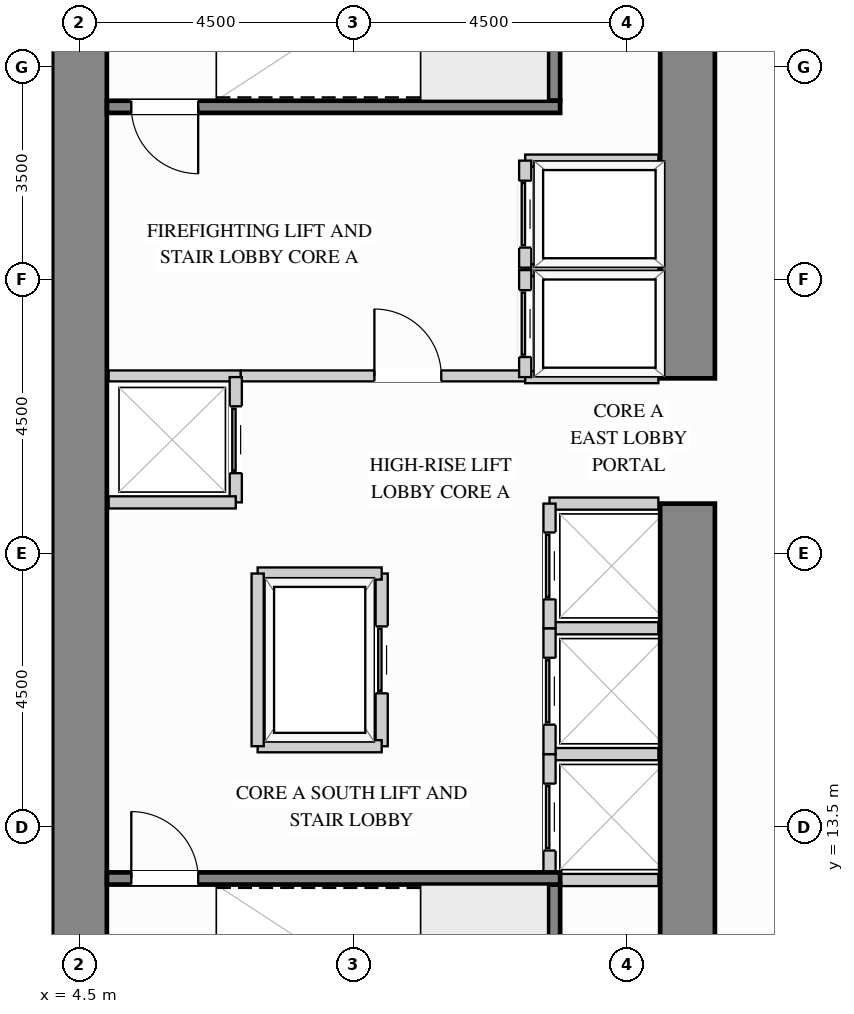
"""IFC4 building model, lengths in metres.
Left out: names, types, materials, properties, quantities, classifications, styles, units other than length and angle.
Written with IfcOpenShell. Run it as: python <this file> out.ifc"""

import sys

from ifc_helpers import new_model, si_unit, direction, frame, frame_2d, origin, place, context, subcontext, project, spatial, rectangle, extrude, source, transform, mapped, element, fill, save


model = new_model("IFC4")
c1 = context("Model", 3, precision=1e-05, world=origin(), true_north=direction((0.0, 1.0)))
c2 = subcontext(c1, "Body", "Model", "MODEL_VIEW")
j1 = project(units=[si_unit("LENGTHUNIT", "METRE"), si_unit("PLANEANGLEUNIT", "RADIAN")], contexts=[c1])
p1 = place(None, origin())
s1 = spatial("IfcSite", under=j1, at=p1, CompositionType="ELEMENT")
p2 = place(p1, origin())
s2 = spatial("IfcBuilding", under=s1, at=p2, CompositionType="ELEMENT")
p3 = place(p2, frame((0.0, 0.0, 4.5)))
s3 = spatial("IfcBuildingStorey", under=s2, at=p3, CompositionType="ELEMENT", Elevation=4.5)
m1 = source(origin(), c2, "Body", "SweptSolid", [
    extrude(rectangle(XDim=9.87, YDim=0.9, at=frame_2d((4.935, 0.0))), origin(), (0.0, 0.0, 1.0), 4.25),
])
p4 = place(p3, frame((14.5, 8.95, 0.0), z_axis=(0.0, 0.0, 1.0), x_axis=(0.0, 1.0, 0.0)))
e1 = element("IfcWall", 1, at=p4, inside=s3, PredefinedType="SHEAR", context=c2, shape_type="MappedRepresentation", body=[
    mapped(m1, transform((0.0, 0.0, 0.0), x_axis=(1.0, 0.0, 0.0), y_axis=(0.0, 1.0, 0.0), z_axis=(0.0, 0.0, 1.0))),
])
m2 = source(origin(), c2, "Body", "SweptSolid", [
    extrude(rectangle(XDim=8.17, YDim=0.9, at=frame_2d((4.085, 0.0))), origin(), (0.0, 0.0, 1.0), 4.25),
])
p5 = place(p3, frame((14.5, 20.88, 0.0), z_axis=(0.0, 0.0, 1.0), x_axis=(0.0, 1.0, 0.0)))
e2 = element("IfcWall", 2, at=p5, inside=s3, PredefinedType="SHEAR", context=c2, shape_type="MappedRepresentation", body=[
    mapped(m2, transform((0.0, 0.0, 0.0), x_axis=(1.0, 0.0, 0.0), y_axis=(0.0, 1.0, 0.0), z_axis=(0.0, 0.0, 1.0))),
])
m3 = source(origin(), c2, "Body", "SweptSolid", [
    extrude(rectangle(XDim=20.1, YDim=0.9, at=frame_2d((10.05, 0.0))), origin(), (0.0, 0.0, 1.0), 4.25),
])
p6 = place(p3, frame((4.5, 8.95, 0.0), z_axis=(0.0, 0.0, 1.0), x_axis=(0.0, 1.0, 0.0)))
e3 = element("IfcWall", 3, at=p6, inside=s3, PredefinedType="SHEAR", context=c2, shape_type="MappedRepresentation", body=[
    mapped(m3, transform((0.0, 0.0, 0.0), x_axis=(1.0, 0.0, 0.0), y_axis=(0.0, 1.0, 0.0), z_axis=(0.0, 0.0, 1.0))),
])
p7 = place(p3, frame((7.15, 20.92, 0.0), z_axis=(0.0, 0.0, 1.0), x_axis=(1.0, 0.0, 0.0)))
e4 = element("IfcWall", 4, at=p7, inside=s3, PredefinedType="PARTITIONING", context=c2, shape_type="SweptSolid", body=[
    extrude(rectangle(XDim=4.68, YDim=0.18, at=frame_2d((2.34, 0.0))), origin(), (0.0, 0.0, 1.0), 4.235),
])
p8 = place(p7, frame((2.2, 0.0, 0.0)))
e5 = element("IfcOpeningElement", 5, at=p8, cuts=e4, PredefinedType="OPENING", context=c2, shape_type="SweptSolid", body=[
    extrude(rectangle(XDim=1.1, YDim=2.15, at=frame_2d((0.55, 1.075))), frame((0.0, 0.1, 0.0), z_axis=(0.0, -1.0, 0.0), x_axis=(1.0, 0.0, 0.0)), (0.0, 0.0, 1.0), 0.2),
])
m4 = source(origin(), c2, "Body", "SweptSolid", [
    extrude(rectangle(XDim=2.17, YDim=0.18, at=frame_2d((1.085, 0.0))), origin(), (0.0, 0.0, 1.0), 4.235),
])
p9 = place(p3, frame((4.98, 20.92, 0.0), z_axis=(0.0, 0.0, 1.0), x_axis=(1.0, 0.0, 0.0)))
e6 = element("IfcWall", 6, at=p9, inside=s3, PredefinedType="PARTITIONING", context=c2, shape_type="MappedRepresentation", body=[
    mapped(m4, transform((0.0, 0.0, 0.0), x_axis=(1.0, 0.0, 0.0), y_axis=(0.0, 1.0, 0.0), z_axis=(0.0, 0.0, 1.0))),
])
m5 = source(origin(), c2, "Body", "SweptSolid", [
    extrude(rectangle(XDim=2.19, YDim=0.2, at=frame_2d((1.095, 0.0))), origin(), (0.0, 0.0, 1.0), 4.235),
])
for number, where, z_axis, x_axis in (
    (7, (11.83, 22.66, 0.0), (0.0, 0.0, 1.0), (1.0, 0.0, 0.0)),
    (8, (11.83, 20.9, 0.0), (0.0, 0.0, 1.0), (1.0, 0.0, 0.0)),
):
    element("IfcWall", number, at=place(p3, frame(where, z_axis=z_axis, x_axis=x_axis)), inside=s3, PredefinedType="PARTITIONING", context=c2, shape_type="MappedRepresentation", body=[
        mapped(m5, transform((0.0, 0.0, 0.0), x_axis=(1.0, 0.0, 0.0), y_axis=(0.0, 1.0, 0.0), z_axis=(0.0, 0.0, 1.0))),
    ])
p10 = place(p3, frame((11.83, 20.9, 0.0), z_axis=(0.0, 0.0, 1.0), x_axis=(0.0, 1.0, 0.0)))
e9 = element("IfcWall", 9, at=p10, inside=s3, PredefinedType="PARTITIONING", context=c2, shape_type="SweptSolid", body=[
    extrude(rectangle(XDim=1.76, YDim=0.2, at=frame_2d((0.88, 0.0))), origin(), (0.0, 0.0, 1.0), 4.235),
])
p11 = place(p10, frame((0.33, 0.0, 0.0)))
e10 = element("IfcOpeningElement", 10, at=p11, cuts=e9, PredefinedType="OPENING", context=c2, shape_type="SweptSolid", body=[
    extrude(rectangle(XDim=1.1, YDim=2.2, at=frame_2d((0.55, 1.1))), frame((0.0, 0.11, 0.0), z_axis=(0.0, -1.0, 0.0), x_axis=(1.0, 0.0, 0.0)), (0.0, 0.0, 1.0), 0.22),
])
p12 = place(p3, frame((11.83, 24.46, 0.0), z_axis=(0.0, 0.0, 1.0), x_axis=(1.0, 0.0, 0.0)))
e11 = element("IfcWall", 11, at=p12, inside=s3, PredefinedType="PARTITIONING", context=c2, shape_type="MappedRepresentation", body=[
    mapped(m5, transform((0.0, 0.0, 0.0), x_axis=(1.0, 0.0, 0.0), y_axis=(0.0, 1.0, 0.0), z_axis=(0.0, 0.0, 1.0))),
])
p13 = place(p3, frame((11.83, 22.7, 0.0), z_axis=(0.0, 0.0, 1.0), x_axis=(0.0, 1.0, 0.0)))
e12 = element("IfcWall", 12, at=p13, inside=s3, PredefinedType="PARTITIONING", context=c2, shape_type="SweptSolid", body=[
    extrude(rectangle(XDim=1.76, YDim=0.2, at=frame_2d((0.88, 0.0))), origin(), (0.0, 0.0, 1.0), 4.235),
])
p14 = place(p13, frame((0.33, 0.0, 0.0)))
e13 = element("IfcOpeningElement", 13, at=p14, cuts=e12, PredefinedType="OPENING", context=c2, shape_type="SweptSolid", body=[
    extrude(rectangle(XDim=1.1, YDim=2.2, at=frame_2d((0.55, 1.1))), frame((0.0, 0.11, 0.0), z_axis=(0.0, -1.0, 0.0), x_axis=(1.0, 0.0, 0.0)), (0.0, 0.0, 1.0), 0.22),
])
m6 = source(origin(), c2, "Body", "SweptSolid", [
    extrude(rectangle(XDim=1.79, YDim=0.2, at=frame_2d((0.895, 0.0))), origin(), (0.0, 0.0, 1.0), 4.235),
])
for number, where, z_axis, x_axis in (
    (14, (12.23, 14.7, 0.0), (0.0, 0.0, 1.0), (1.0, 0.0, 0.0)),
    (15, (12.23, 12.63, 0.0), (0.0, 0.0, 1.0), (1.0, 0.0, 0.0)),
):
    element("IfcWall", number, at=place(p3, frame(where, z_axis=z_axis, x_axis=x_axis)), inside=s3, PredefinedType="PARTITIONING", context=c2, shape_type="MappedRepresentation", body=[
        mapped(m6, transform((0.0, 0.0, 0.0), x_axis=(1.0, 0.0, 0.0), y_axis=(0.0, 1.0, 0.0), z_axis=(0.0, 0.0, 1.0))),
    ])
p15 = place(p3, frame((12.23, 12.63, 0.0), z_axis=(0.0, 0.0, 1.0), x_axis=(0.0, 1.0, 0.0)))
e16 = element("IfcWall", 16, at=p15, inside=s3, PredefinedType="PARTITIONING", context=c2, shape_type="SweptSolid", body=[
    extrude(rectangle(XDim=2.07, YDim=0.2, at=frame_2d((1.035, 0.0))), origin(), (0.0, 0.0, 1.0), 4.235),
])
p16 = place(p15, frame((0.485, 0.0, 0.0)))
e17 = element("IfcOpeningElement", 17, at=p16, cuts=e16, PredefinedType="OPENING", context=c2, shape_type="SweptSolid", body=[
    extrude(rectangle(XDim=1.1, YDim=2.2, at=frame_2d((0.55, 1.1))), frame((0.0, 0.11, 0.0), z_axis=(0.0, -1.0, 0.0), x_axis=(1.0, 0.0, 0.0)), (0.0, 0.0, 1.0), 0.22),
])
p17 = place(p3, frame((12.23, 16.77, 0.0), z_axis=(0.0, 0.0, 1.0), x_axis=(1.0, 0.0, 0.0)))
e18 = element("IfcWall", 18, at=p17, inside=s3, PredefinedType="PARTITIONING", context=c2, shape_type="MappedRepresentation", body=[
    mapped(m6, transform((0.0, 0.0, 0.0), x_axis=(1.0, 0.0, 0.0), y_axis=(0.0, 1.0, 0.0), z_axis=(0.0, 0.0, 1.0))),
])
p18 = place(p3, frame((12.23, 14.7, 0.0), z_axis=(0.0, 0.0, 1.0), x_axis=(0.0, 1.0, 0.0)))
e19 = element("IfcWall", 19, at=p18, inside=s3, PredefinedType="PARTITIONING", context=c2, shape_type="SweptSolid", body=[
    extrude(rectangle(XDim=2.07, YDim=0.2, at=frame_2d((1.035, 0.0))), origin(), (0.0, 0.0, 1.0), 4.235),
])
p19 = place(p18, frame((0.485, 0.0, 0.0)))
e20 = element("IfcOpeningElement", 20, at=p19, cuts=e19, PredefinedType="OPENING", context=c2, shape_type="SweptSolid", body=[
    extrude(rectangle(XDim=1.1, YDim=2.2, at=frame_2d((0.55, 1.1))), frame((0.0, 0.11, 0.0), z_axis=(0.0, -1.0, 0.0), x_axis=(1.0, 0.0, 0.0)), (0.0, 0.0, 1.0), 0.22),
])
p20 = place(p3, frame((12.23, 18.82, 0.0), z_axis=(0.0, 0.0, 1.0), x_axis=(1.0, 0.0, 0.0)))
e21 = element("IfcWall", 21, at=p20, inside=s3, PredefinedType="PARTITIONING", context=c2, shape_type="MappedRepresentation", body=[
    mapped(m6, transform((0.0, 0.0, 0.0), x_axis=(1.0, 0.0, 0.0), y_axis=(0.0, 1.0, 0.0), z_axis=(0.0, 0.0, 1.0))),
])
p21 = place(p3, frame((12.23, 16.77, 0.0), z_axis=(0.0, 0.0, 1.0), x_axis=(0.0, 1.0, 0.0)))
e22 = element("IfcWall", 22, at=p21, inside=s3, PredefinedType="PARTITIONING", context=c2, shape_type="SweptSolid", body=[
    extrude(rectangle(XDim=2.05, YDim=0.2, at=frame_2d((1.025, 0.0))), origin(), (0.0, 0.0, 1.0), 4.235),
])
p22 = place(p21, frame((0.475, 0.0, 0.0)))
e23 = element("IfcOpeningElement", 23, at=p22, cuts=e22, PredefinedType="OPENING", context=c2, shape_type="SweptSolid", body=[
    extrude(rectangle(XDim=1.1, YDim=2.2, at=frame_2d((0.55, 1.1))), frame((0.0, 0.11, 0.0), z_axis=(0.0, -1.0, 0.0), x_axis=(1.0, 0.0, 0.0)), (0.0, 0.0, 1.0), 0.22),
])
p23 = place(p3, frame((7.07, 18.84, 0.0), z_axis=(0.0, 0.0, 1.0), x_axis=(0.0, 1.0, 0.0)))
e24 = element("IfcWall", 24, at=p23, inside=s3, PredefinedType="PARTITIONING", context=c2, shape_type="SweptSolid", body=[
    extrude(rectangle(XDim=2.06, YDim=0.2, at=frame_2d((1.03, 0.0))), origin(), (0.0, 0.0, 1.0), 4.235),
])
p24 = place(p23, frame((0.48, 0.0, 0.0)))
e25 = element("IfcOpeningElement", 25, at=p24, cuts=e24, PredefinedType="OPENING", context=c2, shape_type="SweptSolid", body=[
    extrude(rectangle(XDim=1.1, YDim=2.2, at=frame_2d((0.55, 1.1))), frame((0.0, 0.11, 0.0), z_axis=(0.0, -1.0, 0.0), x_axis=(1.0, 0.0, 0.0)), (0.0, 0.0, 1.0), 0.22),
])
m7 = source(origin(), c2, "Body", "SweptSolid", [
    extrude(rectangle(XDim=2.09, YDim=0.2, at=frame_2d((1.045, 0.0))), origin(), (0.0, 0.0, 1.0), 4.235),
])
p25 = place(p3, frame((4.98, 18.84, 0.0), z_axis=(0.0, 0.0, 1.0), x_axis=(1.0, 0.0, 0.0)))
e26 = element("IfcWall", 26, at=p25, inside=s3, PredefinedType="PARTITIONING", context=c2, shape_type="MappedRepresentation", body=[
    mapped(m7, transform((0.0, 0.0, 0.0), x_axis=(1.0, 0.0, 0.0), y_axis=(0.0, 1.0, 0.0), z_axis=(0.0, 0.0, 1.0))),
])
p26 = place(p3, frame((9.47, 14.83, 0.0), z_axis=(0.0, 0.0, 1.0), x_axis=(0.0, 1.0, 0.0)))
e27 = element("IfcWall", 27, at=p26, inside=s3, PredefinedType="PARTITIONING", context=c2, shape_type="SweptSolid", body=[
    extrude(rectangle(XDim=2.84, YDim=0.2, at=frame_2d((1.42, 0.0))), origin(), (0.0, 0.0, 1.0), 4.235),
])
p27 = place(p26, frame((0.87, 0.0, 0.0)))
e28 = element("IfcOpeningElement", 28, at=p27, cuts=e27, PredefinedType="OPENING", context=c2, shape_type="SweptSolid", body=[
    extrude(rectangle(XDim=1.1, YDim=2.2, at=frame_2d((0.55, 1.1))), frame((0.0, 0.11, 0.0), z_axis=(0.0, -1.0, 0.0), x_axis=(1.0, 0.0, 0.0)), (0.0, 0.0, 1.0), 0.22),
])
m8 = source(origin(), c2, "Body", "SweptSolid", [
    extrude(rectangle(XDim=2.04, YDim=0.2, at=frame_2d((1.02, 0.0))), origin(), (0.0, 0.0, 1.0), 4.235),
])
for number, where, z_axis, x_axis in (
    (29, (7.43, 17.67, 0.0), (0.0, 0.0, 1.0), (1.0, 0.0, 0.0)),
    (30, (7.43, 14.83, 0.0), (0.0, 0.0, 1.0), (1.0, 0.0, 0.0)),
):
    element("IfcWall", number, at=place(p3, frame(where, z_axis=z_axis, x_axis=x_axis)), inside=s3, PredefinedType="PARTITIONING", context=c2, shape_type="MappedRepresentation", body=[
        mapped(m8, transform((0.0, 0.0, 0.0), x_axis=(1.0, 0.0, 0.0), y_axis=(0.0, 1.0, 0.0), z_axis=(0.0, 0.0, 1.0))),
    ])
m9 = source(origin(), c2, "Body", "SweptSolid", [
    extrude(rectangle(XDim=2.84, YDim=0.2, at=frame_2d((1.42, 0.0))), origin(), (0.0, 0.0, 1.0), 4.235),
])
p28 = place(p3, frame((7.43, 14.83, 0.0), z_axis=(0.0, 0.0, 1.0), x_axis=(0.0, 1.0, 0.0)))
e31 = element("IfcWall", 31, at=p28, inside=s3, PredefinedType="PARTITIONING", context=c2, shape_type="MappedRepresentation", body=[
    mapped(m9, transform((0.0, 0.0, 0.0), x_axis=(1.0, 0.0, 0.0), y_axis=(0.0, 1.0, 0.0), z_axis=(0.0, 0.0, 1.0))),
])
m10 = source(origin(), c2, "Body", "SweptSolid", [
    extrude(rectangle(XDim=3.603, YDim=0.2, at=frame_2d((1.802, 0.0))), origin(), (0.0, 0.0, 1.0), 4.25),
])
p29 = place(p3, frame((12.305, 8.952, 0.0), z_axis=(0.0, 0.0, 1.0), x_axis=(0.0, 1.0, 0.0)))
e32 = element("IfcWall", 32, at=p29, inside=s3, PredefinedType="SHEAR", context=c2, shape_type="MappedRepresentation", body=[
    mapped(m10, transform((0.0, 0.0, 0.0), x_axis=(1.0, 0.0, 0.0), y_axis=(0.0, 1.0, 0.0), z_axis=(0.0, 0.0, 1.0))),
])
p30 = place(p3, frame((4.952, 12.655, 0.0), z_axis=(0.0, 0.0, 1.0), x_axis=(1.0, 0.0, 0.0)))
e33 = element("IfcWall", 33, at=p30, inside=s3, PredefinedType="SHEAR", context=c2, shape_type="SweptSolid", body=[
    extrude(rectangle(XDim=7.453, YDim=0.2, at=frame_2d((3.727, 0.0))), origin(), (0.0, 0.0, 1.0), 4.25),
])
p31 = place(p30, frame((0.4, 0.0, 0.0)))
e34 = element("IfcOpeningElement", 34, at=p31, cuts=e33, PredefinedType="OPENING", context=c2, shape_type="SweptSolid", body=[
    extrude(rectangle(XDim=1.1, YDim=2.15, at=frame_2d((0.55, 1.075))), frame((0.0, 0.11, 0.0), z_axis=(0.0, -1.0, 0.0), x_axis=(1.0, 0.0, 0.0)), (0.0, 0.0, 1.0), 0.22),
])
p32 = place(p3, frame((12.305, 25.445, 0.0), z_axis=(0.0, 0.0, 1.0), x_axis=(0.0, 1.0, 0.0)))
e35 = element("IfcWall", 35, at=p32, inside=s3, PredefinedType="SHEAR", context=c2, shape_type="MappedRepresentation", body=[
    mapped(m10, transform((0.0, 0.0, 0.0), x_axis=(1.0, 0.0, 0.0), y_axis=(0.0, 1.0, 0.0), z_axis=(0.0, 0.0, 1.0))),
])
p33 = place(p3, frame((4.952, 25.345, 0.0), z_axis=(0.0, 0.0, 1.0), x_axis=(1.0, 0.0, 0.0)))
e36 = element("IfcWall", 36, at=p33, inside=s3, PredefinedType="SHEAR", context=c2, shape_type="SweptSolid", body=[
    extrude(rectangle(XDim=7.453, YDim=0.2, at=frame_2d((3.727, 0.0))), origin(), (0.0, 0.0, 1.0), 4.25),
])
p34 = place(p33, frame((0.4, 0.0, 0.0)))
e37 = element("IfcOpeningElement", 37, at=p34, cuts=e36, PredefinedType="OPENING", context=c2, shape_type="SweptSolid", body=[
    extrude(rectangle(XDim=1.1, YDim=2.15, at=frame_2d((0.55, 1.075))), frame((0.0, 0.11, 0.0), z_axis=(0.0, -1.0, 0.0), x_axis=(1.0, 0.0, 0.0)), (0.0, 0.0, 1.0), 0.22),
])
m11 = source(origin(), c2, "Body", "SweptSolid", [
    extrude(rectangle(XDim=1.1, YDim=2.15, at=frame_2d((0.55, 1.075))), frame((0.0, 0.025, 0.0), z_axis=(0.0, -1.0, 0.0), x_axis=(1.0, 0.0, 0.0)), (0.0, 0.0, 1.0), 0.05),
])
p35 = place(p8, origin())
e38 = element("IfcDoor", 38, at=p35, inside=s3, OperationType="SINGLE_SWING_LEFT", PredefinedType="DOOR", context=c2, shape_type="MappedRepresentation", body=[
    mapped(m11, transform((0.0, 0.0, 0.0), x_axis=(1.0, 0.0, 0.0), y_axis=(0.0, 1.0, 0.0), z_axis=(0.0, 0.0, 1.0))),
])
fill(e5, e38)
m12 = source(origin(), c2, "Body", "SweptSolid", [
    extrude(rectangle(XDim=1.1, YDim=2.2, at=frame_2d((0.55, 1.1))), frame((0.0, 0.025, 0.0), z_axis=(0.0, -1.0, 0.0), x_axis=(1.0, 0.0, 0.0)), (0.0, 0.0, 1.0), 0.05),
])
p36 = place(p11, origin())
e39 = element("IfcDoor", 39, at=p36, inside=s3, OperationType="SLIDING_TO_LEFT", PredefinedType="DOOR", context=c2, shape_type="MappedRepresentation", body=[
    mapped(m12, transform((0.0, 0.0, 0.0), x_axis=(1.0, 0.0, 0.0), y_axis=(0.0, 1.0, 0.0), z_axis=(0.0, 0.0, 1.0))),
])
fill(e10, e39)
p37 = place(p14, origin())
e40 = element("IfcDoor", 40, at=p37, inside=s3, OperationType="SLIDING_TO_LEFT", PredefinedType="DOOR", context=c2, shape_type="MappedRepresentation", body=[
    mapped(m12, transform((0.0, 0.0, 0.0), x_axis=(1.0, 0.0, 0.0), y_axis=(0.0, 1.0, 0.0), z_axis=(0.0, 0.0, 1.0))),
])
fill(e13, e40)
p38 = place(p16, origin())
e41 = element("IfcDoor", 41, at=p38, inside=s3, OperationType="SLIDING_TO_LEFT", PredefinedType="DOOR", context=c2, shape_type="MappedRepresentation", body=[
    mapped(m12, transform((0.0, 0.0, 0.0), x_axis=(1.0, 0.0, 0.0), y_axis=(0.0, 1.0, 0.0), z_axis=(0.0, 0.0, 1.0))),
])
fill(e17, e41)
p39 = place(p19, origin())
e42 = element("IfcDoor", 42, at=p39, inside=s3, OperationType="SLIDING_TO_LEFT", PredefinedType="DOOR", context=c2, shape_type="MappedRepresentation", body=[
    mapped(m12, transform((0.0, 0.0, 0.0), x_axis=(1.0, 0.0, 0.0), y_axis=(0.0, 1.0, 0.0), z_axis=(0.0, 0.0, 1.0))),
])
fill(e20, e42)
p40 = place(p22, origin())
e43 = element("IfcDoor", 43, at=p40, inside=s3, OperationType="SLIDING_TO_LEFT", PredefinedType="DOOR", context=c2, shape_type="MappedRepresentation", body=[
    mapped(m12, transform((0.0, 0.0, 0.0), x_axis=(1.0, 0.0, 0.0), y_axis=(0.0, 1.0, 0.0), z_axis=(0.0, 0.0, 1.0))),
])
fill(e23, e43)
p41 = place(p24, origin())
e44 = element("IfcDoor", 44, at=p41, inside=s3, OperationType="SLIDING_TO_LEFT", PredefinedType="DOOR", context=c2, shape_type="MappedRepresentation", body=[
    mapped(m12, transform((0.0, 0.0, 0.0), x_axis=(1.0, 0.0, 0.0), y_axis=(0.0, 1.0, 0.0), z_axis=(0.0, 0.0, 1.0))),
])
fill(e25, e44)
p42 = place(p27, origin())
e45 = element("IfcDoor", 45, at=p42, inside=s3, OperationType="SLIDING_TO_LEFT", PredefinedType="DOOR", context=c2, shape_type="MappedRepresentation", body=[
    mapped(m12, transform((0.0, 0.0, 0.0), x_axis=(1.0, 0.0, 0.0), y_axis=(0.0, 1.0, 0.0), z_axis=(0.0, 0.0, 1.0))),
])
fill(e28, e45)
m13 = source(origin(), c2, "Body", "SweptSolid", [
    extrude(rectangle(XDim=1.1, YDim=2.15, at=frame_2d((0.55, 1.075))), frame((0.0, 0.025, 0.0), z_axis=(0.0, -1.0, 0.0), x_axis=(1.0, 0.0, 0.0)), (0.0, 0.0, 1.0), 0.05),
])
p43 = place(p31, origin())
e46 = element("IfcDoor", 46, at=p43, inside=s3, OperationType="SINGLE_SWING_LEFT", PredefinedType="DOOR", context=c2, shape_type="MappedRepresentation", body=[
    mapped(m13, transform((0.0, 0.0, 0.0), x_axis=(1.0, 0.0, 0.0), y_axis=(0.0, 1.0, 0.0), z_axis=(0.0, 0.0, 1.0))),
])
fill(e34, e46)
p44 = place(p34, origin())
e47 = element("IfcDoor", 47, at=p44, inside=s3, OperationType="SINGLE_SWING_RIGHT", PredefinedType="DOOR", context=c2, shape_type="MappedRepresentation", body=[
    mapped(m13, transform((0.0, 0.0, 0.0), x_axis=(1.0, 0.0, 0.0), y_axis=(0.0, 1.0, 0.0), z_axis=(0.0, 0.0, 1.0))),
])
fill(e37, e47)
save(model, sys.argv[1])
